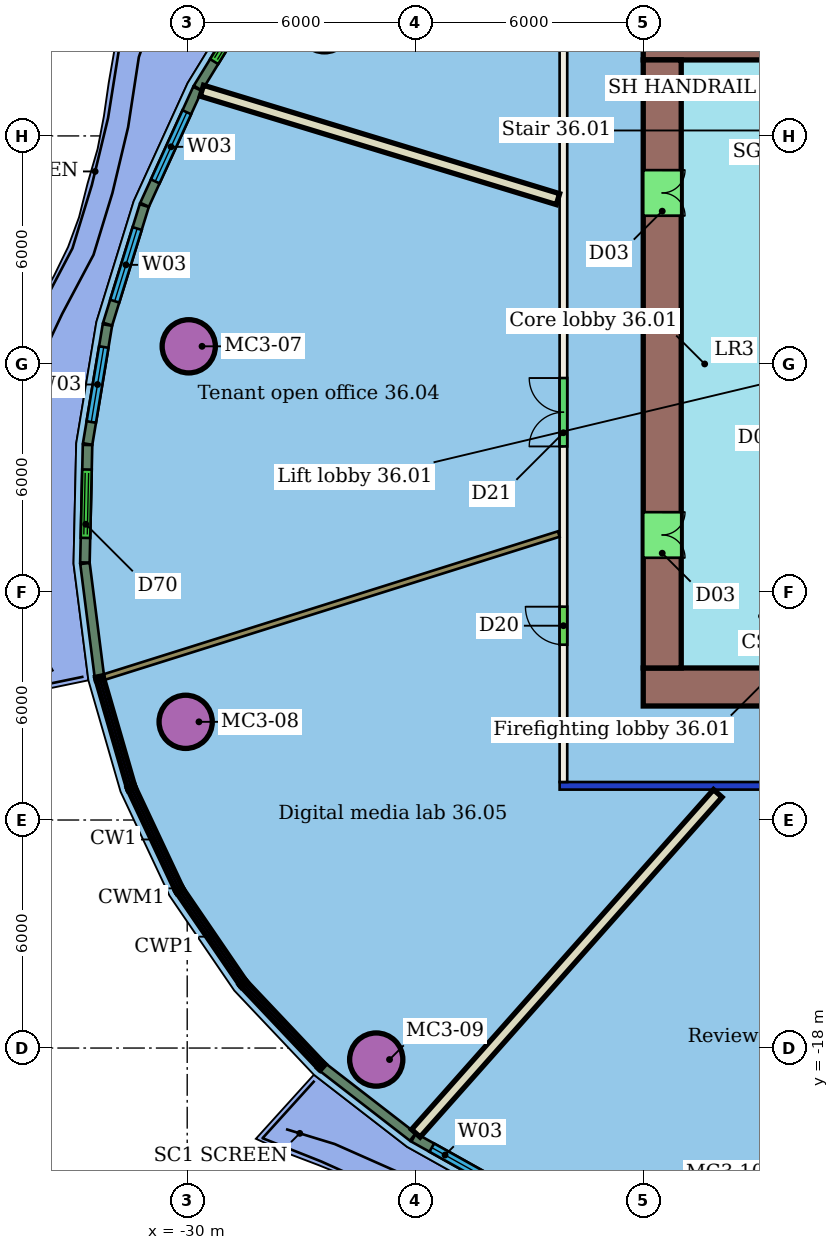
"""IFC4 building model, lengths in metres.
Left out: names, types, materials, properties, quantities, classifications, styles, units other than length and angle.
Written with IfcOpenShell. Run it as: python <this file> out.ifc"""

import sys

from ifc_helpers import new_model, si_unit, direction, frame, frame_2d, origin, origin_2d, place, context, subcontext, project, spatial, rectangle, hollow_circle, extrude, element, fill, save


model = new_model("IFC4")
c1 = context("Model", 3, precision=1e-05, world=origin(), true_north=direction((0.0, 1.0)))
c2 = subcontext(c1, "Body", "Model", "MODEL_VIEW")
j1 = project(units=[si_unit("LENGTHUNIT", "METRE"), si_unit("PLANEANGLEUNIT", "RADIAN")], contexts=[c1])
p1 = place(None, origin())
s1 = spatial("IfcSite", under=j1, at=p1, CompositionType="ELEMENT")
p2 = place(p1, origin())
s2 = spatial("IfcBuilding", under=s1, at=p2, CompositionType="ELEMENT")
p3 = place(p2, frame((0.0, 0.0, 154.2)))
s3 = spatial("IfcBuildingStorey", under=s2, at=p3, CompositionType="ELEMENT", Elevation=154.2)
for number, where, z_axis, x_axis in (
    (1, (-29.959, 0.464, 0.0), (0.0, 0.0, 1.0), (1.0, 0.0, 0.0)),
    (2, (-30.041, -9.417, 0.0), (0.0, 0.0, 1.0), (1.0, 0.0, 0.0)),
    (3, (-25.026, -18.303, 0.0), (0.0, 0.0, 1.0), (1.0, 0.0, 0.0)),
):
    element("IfcColumn", number, at=place(p3, frame(where, z_axis=z_axis, x_axis=x_axis)), inside=s3, PredefinedType="COLUMN", context=c2, shape_type="SweptSolid", body=[
        extrude(hollow_circle(Radius=0.7, WallThickness=0.05, at=origin_2d()), origin(), (0.0, 0.0, 1.0), 3.45),
    ])
p4 = place(p3, frame((8.2, -11.1, 0.0), z_axis=(0.0, 0.0, 1.0), x_axis=(-1.0, 0.0, 0.0)))
e4 = element("IfcWall", 4, at=p4, inside=s3, PredefinedType="PARTITIONING", context=c2, shape_type="SweptSolid", body=[
    extrude(rectangle(XDim=28.4, YDim=0.2, at=frame_2d((14.2, 0.0))), origin(), (0.0, 0.0, 1.0), 3.05),
])
p5 = place(p4, frame((17.611, 0.0, 0.0)))
e5 = element("IfcOpeningElement", 5, at=p5, cuts=e4, PredefinedType="OPENING", context=c2, shape_type="SweptSolid", body=[
    extrude(rectangle(XDim=1.8, YDim=2.4, at=frame_2d((0.9, 1.2))), frame((0.0, 0.11, 0.0), z_axis=(0.0, -1.0, 0.0), x_axis=(1.0, 0.0, 0.0)), (0.0, 0.0, 1.0), 0.22),
])
p6 = place(p4, frame((8.032, 0.0, 0.0)))
e6 = element("IfcOpeningElement", 6, at=p6, cuts=e4, PredefinedType="OPENING", context=c2, shape_type="SweptSolid", body=[
    extrude(rectangle(XDim=1.2, YDim=2.1, at=frame_2d((0.6, 1.05))), frame((0.0, 0.11, 0.0), z_axis=(0.0, -1.0, 0.0), x_axis=(1.0, 0.0, 0.0)), (0.0, 0.0, 1.0), 0.22),
])
p7 = place(p3, frame((-20.1, -11.0, 0.0), z_axis=(0.0, 0.0, 1.0), x_axis=(0.0, 1.0, 0.0)))
e7 = element("IfcWall", 7, at=p7, inside=s3, PredefinedType="PARTITIONING", context=c2, shape_type="SweptSolid", body=[
    extrude(rectangle(XDim=22.0, YDim=0.2, at=frame_2d((11.0, 0.0))), origin(), (0.0, 0.0, 1.0), 3.45),
])
p8 = place(p7, frame((8.83, 0.0, 0.0)))
e8 = element("IfcOpeningElement", 8, at=p8, cuts=e7, PredefinedType="OPENING", context=c2, shape_type="SweptSolid", body=[
    extrude(rectangle(XDim=1.8, YDim=2.1, at=frame_2d((0.9, 1.05))), frame((0.0, 0.11, 0.0), z_axis=(0.0, -1.0, 0.0), x_axis=(1.0, 0.0, 0.0)), (0.0, 0.0, 1.0), 0.22),
])
p9 = place(p7, frame((3.613, 0.0, 0.0)))
e9 = element("IfcOpeningElement", 9, at=p9, cuts=e7, PredefinedType="OPENING", context=c2, shape_type="SweptSolid", body=[
    extrude(rectangle(XDim=1.0, YDim=2.1, at=frame_2d((0.5, 1.05))), frame((0.0, 0.11, 0.0), z_axis=(0.0, -1.0, 0.0), x_axis=(1.0, 0.0, 0.0)), (0.0, 0.0, 1.0), 0.22),
])
p10 = place(p3, frame((-29.615, 7.19, 0.0), z_axis=(0.0, 0.0, 1.0), x_axis=(0.956644596767, -0.291257816164, 0.0)))
e10 = element("IfcWall", 10, at=p10, inside=s3, PredefinedType="PARTITIONING", context=c2, shape_type="SweptSolid", body=[
    extrude(rectangle(XDim=9.796, YDim=0.3, at=frame_2d((4.898, 0.0))), origin(), (0.0, 0.0, 1.0), 3.45),
])
p11 = place(p3, frame((-32.184, -8.238, 0.0), z_axis=(0.0, 0.0, 1.0), x_axis=(0.953901387516, 0.300120214074, 0.0)))
e11 = element("IfcWall", 11, at=p11, inside=s3, PredefinedType="PARTITIONING", context=c2, shape_type="SweptSolid", body=[
    extrude(rectangle(XDim=12.54, YDim=0.15, at=frame_2d((6.27, 0.0))), origin(), (0.0, 0.0, 1.0), 3.45),
])
p12 = place(p3, frame((-23.983, -20.243, 0.0), z_axis=(0.0, 0.0, 1.0), x_axis=(0.664148461509, 0.747600709654, 0.0)))
e12 = element("IfcWall", 12, at=p12, inside=s3, PredefinedType="PARTITIONING", context=c2, shape_type="SweptSolid", body=[
    extrude(rectangle(XDim=11.962, YDim=0.3, at=frame_2d((5.981, 0.0))), origin(), (0.0, 0.0, 1.0), 3.45),
])
p13 = place(p3, frame((-27.921, 10.187, 0.0), z_axis=(0.0, 0.0, 1.0), x_axis=(-0.52303850946, -0.852309050534, 0.0)))
e13 = element("IfcWall", 13, at=p13, inside=s3, PredefinedType="SOLIDWALL", context=c2, shape_type="SweptSolid", body=[
    extrude(rectangle(XDim=3.436, YDim=0.25, at=frame_2d((1.718, 0.0))), origin(), (0.0, 0.0, 1.0), 3.1),
])
p14 = place(p13, frame((0.818, 0.0, 0.0)))
e14 = element("IfcOpeningElement", 14, at=p14, cuts=e13, PredefinedType="OPENING", context=c2, shape_type="SweptSolid", body=[
    extrude(rectangle(XDim=1.8, YDim=2.4, at=frame_2d((0.9, 1.2))), frame((0.0, 0.135, 0.0), z_axis=(0.0, -1.0, 0.0), x_axis=(1.0, 0.0, 0.0)), (0.0, 0.0, 1.0), 0.27),
])
p15 = place(p3, frame((-29.729, 7.238, 0.0), z_axis=(0.0, 0.0, 1.0), x_axis=(-0.415294970102, -0.909686807537, 0.0)))
e15 = element("IfcWall", 15, at=p15, inside=s3, PredefinedType="SOLIDWALL", context=c2, shape_type="SweptSolid", body=[
    extrude(rectangle(XDim=3.352, YDim=0.25, at=frame_2d((1.676, 0.0))), origin(), (0.0, 0.0, 1.0), 3.1),
])
p16 = place(p15, frame((0.676, 0.0, 0.9)))
e16 = element("IfcOpeningElement", 16, at=p16, cuts=e15, PredefinedType="OPENING", context=c2, shape_type="SweptSolid", body=[
    extrude(rectangle(XDim=2.0, YDim=2.1, at=frame_2d((1.0, 1.05))), frame((0.0, 0.135, 0.0), z_axis=(0.0, -1.0, 0.0), x_axis=(1.0, 0.0, 0.0)), (0.0, 0.0, 1.0), 0.27),
])
p17 = place(p3, frame((-31.13, 4.166, 0.0), z_axis=(0.0, 0.0, 1.0), x_axis=(-0.295410582075, -0.955370393093, 0.0)))
e17 = element("IfcWall", 17, at=p17, inside=s3, PredefinedType="SOLIDWALL", context=c2, shape_type="SweptSolid", body=[
    extrude(rectangle(XDim=3.263, YDim=0.25, at=frame_2d((1.631, 0.0))), origin(), (0.0, 0.0, 1.0), 3.1),
])
p18 = place(p17, frame((0.631, 0.0, 0.9)))
e18 = element("IfcOpeningElement", 18, at=p18, cuts=e17, PredefinedType="OPENING", context=c2, shape_type="SweptSolid", body=[
    extrude(rectangle(XDim=2.0, YDim=2.1, at=frame_2d((1.0, 1.05))), frame((0.0, 0.135, 0.0), z_axis=(0.0, -1.0, 0.0), x_axis=(1.0, 0.0, 0.0)), (0.0, 0.0, 1.0), 0.27),
])
p19 = place(p3, frame((-32.1, 1.025, 0.0), z_axis=(0.0, 0.0, 1.0), x_axis=(-0.163912512181, -0.986474879736, 0.0)))
e19 = element("IfcWall", 19, at=p19, inside=s3, PredefinedType="SOLIDWALL", context=c2, shape_type="SweptSolid", body=[
    extrude(rectangle(XDim=3.174, YDim=0.25, at=frame_2d((1.587, 0.0))), origin(), (0.0, 0.0, 1.0), 3.1),
])
p20 = place(p19, frame((0.587, 0.0, 0.9)))
e20 = element("IfcOpeningElement", 20, at=p20, cuts=e19, PredefinedType="OPENING", context=c2, shape_type="SweptSolid", body=[
    extrude(rectangle(XDim=2.0, YDim=2.1, at=frame_2d((1.0, 1.05))), frame((0.0, 0.135, 0.0), z_axis=(0.0, -1.0, 0.0), x_axis=(1.0, 0.0, 0.0)), (0.0, 0.0, 1.0), 0.27),
])
p21 = place(p3, frame((-32.623, -2.132, 0.0), z_axis=(0.0, 0.0, 1.0), x_axis=(-0.022342995581, -0.999750364115, 0.0)))
e21 = element("IfcWall", 21, at=p21, inside=s3, PredefinedType="SOLIDWALL", context=c2, shape_type="SweptSolid", body=[
    extrude(rectangle(XDim=3.092, YDim=0.25, at=frame_2d((1.546, 0.0))), origin(), (0.0, 0.0, 1.0), 3.1),
])
p22 = place(p21, frame((0.646, 0.0, 0.0)))
e22 = element("IfcOpeningElement", 22, at=p22, cuts=e21, PredefinedType="OPENING", context=c2, shape_type="SweptSolid", body=[
    extrude(rectangle(XDim=1.8, YDim=2.4, at=frame_2d((0.9, 1.2))), frame((0.0, 0.135, 0.0), z_axis=(0.0, -1.0, 0.0), x_axis=(1.0, 0.0, 0.0)), (0.0, 0.0, 1.0), 0.27),
])
p23 = place(p3, frame((-32.69, -5.25, 0.0), z_axis=(0.0, 0.0, 1.0), x_axis=(0.1263011447, -0.991991945959, 0.0)))
e23 = element("IfcWall", 23, at=p23, inside=s3, PredefinedType="SOLIDWALL", context=c2, shape_type="SweptSolid", body=[
    extrude(rectangle(XDim=2.983, YDim=0.25, at=frame_2d((1.491, 0.0))), origin(), (0.0, 0.0, 1.0), 3.1),
])
p24 = place(p3, frame((-26.421, -18.513, 0.0), z_axis=(0.0, 0.0, 1.0), x_axis=(0.790822117726, -0.612046058818, 0.0)))
e24 = element("IfcWall", 24, at=p24, inside=s3, PredefinedType="SOLIDWALL", context=c2, shape_type="SweptSolid", body=[
    extrude(rectangle(XDim=2.982, YDim=0.25, at=frame_2d((1.491, 0.0))), origin(), (0.0, 0.0, 1.0), 3.1),
])
p25 = place(p3, frame((-24.041, -20.354, 0.0), z_axis=(0.0, 0.0, 1.0), x_axis=(0.872921725824, -0.487860287976, 0.0)))
e25 = element("IfcWall", 25, at=p25, inside=s3, PredefinedType="SOLIDWALL", context=c2, shape_type="SweptSolid", body=[
    extrude(rectangle(XDim=3.092, YDim=0.25, at=frame_2d((1.546, 0.0))), origin(), (0.0, 0.0, 1.0), 3.1),
])
p26 = place(p25, frame((0.546, 0.0, 0.9)))
e26 = element("IfcOpeningElement", 26, at=p26, cuts=e25, PredefinedType="OPENING", context=c2, shape_type="SweptSolid", body=[
    extrude(rectangle(XDim=2.0, YDim=2.1, at=frame_2d((1.0, 1.05))), frame((0.0, 0.135, 0.0), z_axis=(0.0, -1.0, 0.0), x_axis=(1.0, 0.0, 0.0)), (0.0, 0.0, 1.0), 0.27),
])
p27 = place(p3, frame((-6.0, 8.5, 0.0), z_axis=(0.0, 0.0, 1.0), x_axis=(-1.0, 0.0, 0.0)))
e27 = element("IfcWall", 27, at=p27, inside=s3, PredefinedType="SHEAR", context=c2, shape_type="SweptSolid", body=[
    extrude(rectangle(XDim=12.0, YDim=1.0, at=frame_2d((6.0, 0.0))), origin(), (0.0, 0.0, 1.0), 3.3),
])
p28 = place(p27, frame((5.2, 0.0, 0.0)))
e28 = element("IfcOpeningElement", 28, at=p28, cuts=e27, PredefinedType="OPENING", context=c2, shape_type="SweptSolid", body=[
    extrude(rectangle(XDim=1.2, YDim=2.1, at=frame_2d((0.6, 1.05))), frame((0.0, 0.51, 0.0), z_axis=(0.0, -1.0, 0.0), x_axis=(1.0, 0.0, 0.0)), (0.0, 0.0, 1.0), 1.02),
])
p29 = place(p3, frame((-18.0, -8.5, 0.0), z_axis=(0.0, 0.0, 1.0), x_axis=(1.0, 0.0, 0.0)))
e29 = element("IfcWall", 29, at=p29, inside=s3, PredefinedType="SHEAR", context=c2, shape_type="SweptSolid", body=[
    extrude(rectangle(XDim=24.0, YDim=1.0, at=frame_2d((12.0, 0.0))), origin(), (0.0, 0.0, 1.0), 3.3),
])
p30 = place(p29, frame((6.0, 0.0, 0.0)))
e30 = element("IfcOpeningElement", 30, at=p30, cuts=e29, PredefinedType="OPENING", context=c2, shape_type="SweptSolid", body=[
    extrude(rectangle(XDim=1.2, YDim=2.1, at=frame_2d((0.6, 1.05))), frame((0.0, 0.51, 0.0), z_axis=(0.0, -1.0, 0.0), x_axis=(1.0, 0.0, 0.0)), (0.0, 0.0, 1.0), 1.02),
])
p31 = place(p3, frame((-17.5, 8.0, 0.0), z_axis=(0.0, 0.0, 1.0), x_axis=(0.0, -1.0, 0.0)))
e31 = element("IfcWall", 31, at=p31, inside=s3, PredefinedType="SHEAR", context=c2, shape_type="SweptSolid", body=[
    extrude(rectangle(XDim=16.0, YDim=1.0, at=frame_2d((8.0, 0.0))), origin(), (0.0, 0.0, 1.0), 3.3),
])
p32 = place(p31, frame((11.9, 0.0, 0.0)))
e32 = element("IfcOpeningElement", 32, at=p32, cuts=e31, PredefinedType="OPENING", context=c2, shape_type="SweptSolid", body=[
    extrude(rectangle(XDim=1.2, YDim=2.1, at=frame_2d((0.6, 1.05))), frame((0.0, 0.51, 0.0), z_axis=(0.0, -1.0, 0.0), x_axis=(1.0, 0.0, 0.0)), (0.0, 0.0, 1.0), 1.02),
])
p33 = place(p31, frame((2.9, 0.0, 0.0)))
e33 = element("IfcOpeningElement", 33, at=p33, cuts=e31, PredefinedType="OPENING", context=c2, shape_type="SweptSolid", body=[
    extrude(rectangle(XDim=1.2, YDim=2.1, at=frame_2d((0.6, 1.05))), frame((0.0, 0.51, 0.0), z_axis=(0.0, -1.0, 0.0), x_axis=(1.0, 0.0, 0.0)), (0.0, 0.0, 1.0), 1.02),
])
p34 = place(p8, origin())
e34 = element("IfcDoor", 34, at=p34, inside=s3, OperationType="DOUBLE_DOOR_SINGLE_SWING", PredefinedType="DOOR", context=c2, shape_type="SweptSolid", body=[
    extrude(rectangle(XDim=1.8, YDim=2.1, at=frame_2d((0.9, 1.05))), frame((0.0, 0.025, 0.0), z_axis=(0.0, -1.0, 0.0), x_axis=(1.0, 0.0, 0.0)), (0.0, 0.0, 1.0), 0.05),
])
fill(e8, e34)
p35 = place(p9, origin())
e35 = element("IfcDoor", 35, at=p35, inside=s3, OperationType="SINGLE_SWING_RIGHT", PredefinedType="DOOR", context=c2, shape_type="SweptSolid", body=[
    extrude(rectangle(XDim=1.0, YDim=2.1, at=frame_2d((0.5, 1.05))), frame((0.0, 0.025, 0.0), z_axis=(0.0, -1.0, 0.0), x_axis=(1.0, 0.0, 0.0)), (0.0, 0.0, 1.0), 0.05),
])
fill(e9, e35)
p36 = place(p14, origin())
e36 = element("IfcDoor", 36, at=p36, inside=s3, OperationType="DOUBLE_DOOR_SLIDING", PredefinedType="DOOR", context=c2, shape_type="SweptSolid", body=[
    extrude(rectangle(XDim=1.8, YDim=2.4, at=frame_2d((0.9, 1.2))), frame((0.0, 0.025, 0.0), z_axis=(0.0, -1.0, 0.0), x_axis=(1.0, 0.0, 0.0)), (0.0, 0.0, 1.0), 0.05),
])
fill(e14, e36)
p37 = place(p16, origin())
e37 = element("IfcWindow", 37, at=p37, inside=s3, PartitioningType="SINGLE_PANEL", PredefinedType="WINDOW", context=c2, shape_type="SweptSolid", body=[
    extrude(rectangle(XDim=2.0, YDim=2.1, at=frame_2d((1.0, 1.05))), frame((0.0, 0.03, 0.0), z_axis=(0.0, -1.0, 0.0), x_axis=(1.0, 0.0, 0.0)), (0.0, 0.0, 1.0), 0.06),
])
fill(e16, e37)
p38 = place(p18, origin())
e38 = element("IfcWindow", 38, at=p38, inside=s3, PartitioningType="SINGLE_PANEL", PredefinedType="WINDOW", context=c2, shape_type="SweptSolid", body=[
    extrude(rectangle(XDim=2.0, YDim=2.1, at=frame_2d((1.0, 1.05))), frame((0.0, 0.03, 0.0), z_axis=(0.0, -1.0, 0.0), x_axis=(1.0, 0.0, 0.0)), (0.0, 0.0, 1.0), 0.06),
])
fill(e18, e38)
p39 = place(p20, origin())
e39 = element("IfcWindow", 39, at=p39, inside=s3, PartitioningType="SINGLE_PANEL", PredefinedType="WINDOW", context=c2, shape_type="SweptSolid", body=[
    extrude(rectangle(XDim=2.0, YDim=2.1, at=frame_2d((1.0, 1.05))), frame((0.0, 0.03, 0.0), z_axis=(0.0, -1.0, 0.0), x_axis=(1.0, 0.0, 0.0)), (0.0, 0.0, 1.0), 0.06),
])
fill(e20, e39)
p40 = place(p22, origin())
e40 = element("IfcDoor", 40, at=p40, inside=s3, OperationType="DOUBLE_DOOR_SLIDING", PredefinedType="DOOR", context=c2, shape_type="SweptSolid", body=[
    extrude(rectangle(XDim=1.8, YDim=2.4, at=frame_2d((0.9, 1.2))), frame((0.0, 0.025, 0.0), z_axis=(0.0, -1.0, 0.0), x_axis=(1.0, 0.0, 0.0)), (0.0, 0.0, 1.0), 0.05),
])
fill(e22, e40)
p41 = place(p26, origin())
e41 = element("IfcWindow", 41, at=p41, inside=s3, PartitioningType="SINGLE_PANEL", PredefinedType="WINDOW", context=c2, shape_type="SweptSolid", body=[
    extrude(rectangle(XDim=2.0, YDim=2.1, at=frame_2d((1.0, 1.05))), frame((0.0, 0.03, 0.0), z_axis=(0.0, -1.0, 0.0), x_axis=(1.0, 0.0, 0.0)), (0.0, 0.0, 1.0), 0.06),
])
fill(e26, e41)
p42 = place(p32, origin())
e42 = element("IfcDoor", 42, at=p42, inside=s3, OperationType="DOUBLE_DOOR_SINGLE_SWING", PredefinedType="NOTDEFINED", context=c2, shape_type="SweptSolid", body=[
    extrude(rectangle(XDim=1.2, YDim=2.1, at=frame_2d((0.6, 1.05))), frame((0.0, 0.025, 0.0), z_axis=(0.0, -1.0, 0.0), x_axis=(1.0, 0.0, 0.0)), (0.0, 0.0, 1.0), 0.05),
])
fill(e32, e42)
p43 = place(p33, origin())
e43 = element("IfcDoor", 43, at=p43, inside=s3, OperationType="DOUBLE_DOOR_SINGLE_SWING", PredefinedType="NOTDEFINED", context=c2, shape_type="SweptSolid", body=[
    extrude(rectangle(XDim=1.2, YDim=2.1, at=frame_2d((0.6, 1.05))), frame((0.0, 0.025, 0.0), z_axis=(0.0, -1.0, 0.0), x_axis=(1.0, 0.0, 0.0)), (0.0, 0.0, 1.0), 0.05),
])
fill(e33, e43)
save(model, sys.argv[1])
